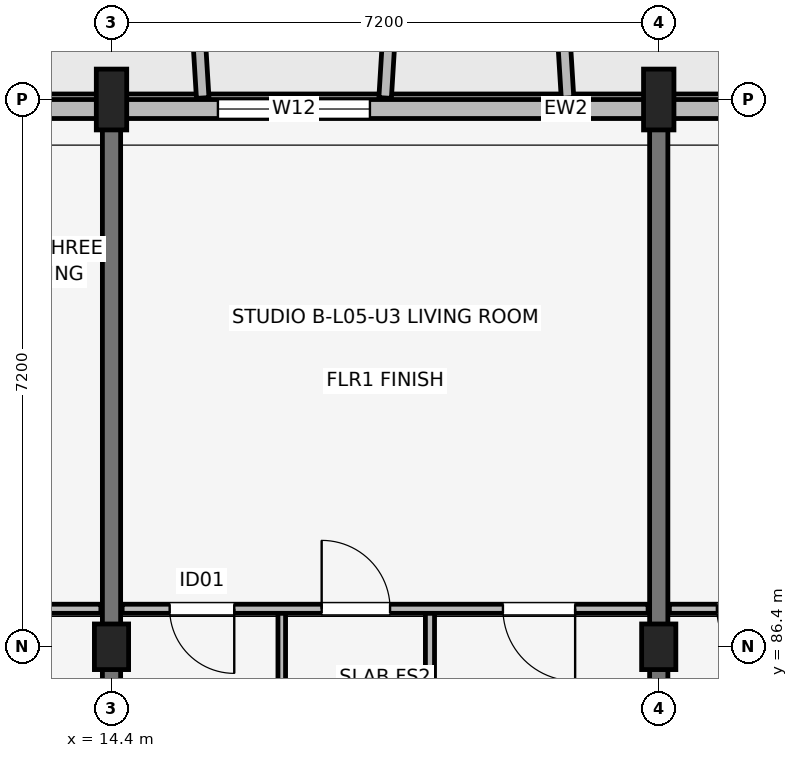
"""IFC4 building model, lengths in metres.
Left out: names, types, materials, properties, quantities, classifications, styles, units other than length and angle.
Written with IfcOpenShell. Run it as: python <this file> out.ifc"""

import sys

from ifc_helpers import new_model, si_unit, direction, frame, frame_2d, origin, origin_2d, place, context, subcontext, project, spatial, rectangle, extrude, element, fill, save


model = new_model("IFC4")
c1 = context("Model", 3, precision=1e-05, world=origin(), true_north=direction((0.0, 1.0)))
c2 = subcontext(c1, "Body", "Model", "MODEL_VIEW")
j1 = project(units=[si_unit("LENGTHUNIT", "METRE"), si_unit("PLANEANGLEUNIT", "RADIAN")], contexts=[c1])
p1 = place(None, origin())
s1 = spatial("IfcSite", under=j1, at=p1, CompositionType="ELEMENT")
p2 = place(p1, origin())
s2 = spatial("IfcBuilding", under=s1, at=p2, CompositionType="ELEMENT")
p3 = place(p2, frame((0.0, 0.0, 18.15)))
s3 = spatial("IfcBuildingStorey", under=s2, at=p3, CompositionType="ELEMENT", Elevation=18.15)
p4 = place(p3, frame((14.4, 86.4, 0.0), z_axis=(0.0, 0.0, 1.0), x_axis=(1.0, 0.0, 0.0)))
e1 = element("IfcColumn", 1, at=p4, inside=s3, PredefinedType="COLUMN", context=c2, shape_type="SweptSolid", body=[
    extrude(rectangle(XDim=0.45, YDim=0.6, at=origin_2d()), origin(), (0.0, 0.0, 1.0), 3.15),
])
p5 = place(p3, frame((14.4, 93.6, 0.0), z_axis=(0.0, 0.0, 1.0), x_axis=(1.0, 0.0, 0.0)))
e2 = element("IfcColumn", 2, at=p5, inside=s3, PredefinedType="COLUMN", context=c2, shape_type="SweptSolid", body=[
    extrude(rectangle(XDim=0.4, YDim=0.8, at=origin_2d()), origin(), (0.0, 0.0, 1.0), 3.15),
])
p6 = place(p3, frame((21.6, 86.4, 0.0), z_axis=(0.0, 0.0, 1.0), x_axis=(1.0, 0.0, 0.0)))
e3 = element("IfcColumn", 3, at=p6, inside=s3, PredefinedType="COLUMN", context=c2, shape_type="SweptSolid", body=[
    extrude(rectangle(XDim=0.45, YDim=0.6, at=origin_2d()), origin(), (0.0, 0.0, 1.0), 3.15),
])
p7 = place(p3, frame((21.6, 93.6, 0.0), z_axis=(0.0, 0.0, 1.0), x_axis=(1.0, 0.0, 0.0)))
e4 = element("IfcColumn", 4, at=p7, inside=s3, PredefinedType="COLUMN", context=c2, shape_type="SweptSolid", body=[
    extrude(rectangle(XDim=0.4, YDim=0.8, at=origin_2d()), origin(), (0.0, 0.0, 1.0), 3.15),
])
for number, where, z_axis, x_axis in (
    (5, (14.4, 83.85, 0.0), (0.0, 0.0, 1.0), (0.0, 1.0, 0.0)),
    (6, (21.6, 83.85, 0.0), (0.0, 0.0, 1.0), (0.0, 1.0, 0.0)),
):
    element("IfcWall", number, at=place(p3, frame(where, z_axis=z_axis, x_axis=x_axis)), inside=s3, PredefinedType="SHEAR", context=c2, shape_type="SweptSolid", body=[
        extrude(rectangle(XDim=9.4, YDim=0.24, at=frame_2d((4.7, 0.0))), origin(), (0.0, 0.0, 1.0), 3.15),
    ])
p8 = place(p3, frame((32.8, 93.475, 0.0), z_axis=(0.0, 0.0, 1.0), x_axis=(-1.0, 0.0, 0.0)))
e7 = element("IfcWall", 7, at=p8, inside=s3, PredefinedType="SOLIDWALL", context=c2, shape_type="SweptSolid", body=[
    extrude(rectangle(XDim=29.6, YDim=0.25, at=frame_2d((14.8, 0.0))), origin(), (0.0, 0.0, 1.0), 2.43),
])
p9 = place(p8, frame((21.625, 0.0, 0.0), z_axis=(0.0, 0.0, 1.0), x_axis=(-1.0, 0.0, 0.0)))
e8 = element("IfcOpeningElement", 8, at=p9, cuts=e7, PredefinedType="OPENING", context=c2, shape_type="SweptSolid", body=[
    extrude(rectangle(XDim=1.65, YDim=2.15, at=frame_2d((0.825, 1.075))), frame((0.0, 0.135, 0.0), z_axis=(0.0, -1.0, 0.0), x_axis=(1.0, 0.0, 0.0)), (0.0, 0.0, 1.0), 0.27),
])
p10 = place(p8, frame((7.15, 0.0, 0.0), z_axis=(0.0, 0.0, 1.0), x_axis=(-1.0, 0.0, 0.0)))
e9 = element("IfcOpeningElement", 9, at=p10, cuts=e7, PredefinedType="OPENING", context=c2, shape_type="SweptSolid", body=[
    extrude(rectangle(XDim=1.5, YDim=2.15, at=frame_2d((0.75, 1.075))), frame((0.0, 0.135, 0.0), z_axis=(0.0, -1.0, 0.0), x_axis=(1.0, 0.0, 0.0)), (0.0, 0.0, 1.0), 0.27),
])
p11 = place(p8, frame((27.615, 0.0, 0.75)))
e10 = element("IfcOpeningElement", 10, at=p11, cuts=e7, PredefinedType="OPENING", context=c2, shape_type="SweptSolid", body=[
    extrude(rectangle(XDim=0.6, YDim=1.25, at=frame_2d((0.3, 0.625))), frame((0.0, 0.135, 0.0), z_axis=(0.0, -1.0, 0.0), x_axis=(1.0, 0.0, 0.0)), (0.0, 0.0, 1.0), 0.27),
])
p12 = place(p8, frame((23.525, 0.0, 0.75)))
e11 = element("IfcOpeningElement", 11, at=p12, cuts=e7, PredefinedType="OPENING", context=c2, shape_type="SweptSolid", body=[
    extrude(rectangle(XDim=0.72, YDim=1.35, at=frame_2d((0.36, 0.675))), frame((0.0, 0.135, 0.0), z_axis=(0.0, -1.0, 0.0), x_axis=(1.0, 0.0, 0.0)), (0.0, 0.0, 1.0), 0.27),
])
p13 = place(p8, frame((15.0, 0.0, 0.67)))
e12 = element("IfcOpeningElement", 12, at=p13, cuts=e7, PredefinedType="OPENING", context=c2, shape_type="SweptSolid", body=[
    extrude(rectangle(XDim=2.0, YDim=1.65, at=frame_2d((1.0, 0.825))), frame((0.0, 0.135, 0.0), z_axis=(0.0, -1.0, 0.0), x_axis=(1.0, 0.0, 0.0)), (0.0, 0.0, 1.0), 0.27),
])
p14 = place(p8, frame((9.125, 0.0, 0.75)))
e13 = element("IfcOpeningElement", 13, at=p14, cuts=e7, PredefinedType="OPENING", context=c2, shape_type="SweptSolid", body=[
    extrude(rectangle(XDim=0.72, YDim=1.35, at=frame_2d((0.36, 0.675))), frame((0.0, 0.135, 0.0), z_axis=(0.0, -1.0, 0.0), x_axis=(1.0, 0.0, 0.0)), (0.0, 0.0, 1.0), 0.27),
])
p15 = place(p8, frame((0.525, 0.0, 0.67)))
e14 = element("IfcOpeningElement", 14, at=p15, cuts=e7, PredefinedType="OPENING", context=c2, shape_type="SweptSolid", body=[
    extrude(rectangle(XDim=2.15, YDim=1.65, at=frame_2d((1.075, 0.825))), frame((0.0, 0.135, 0.0), z_axis=(0.0, -1.0, 0.0), x_axis=(1.0, 0.0, 0.0)), (0.0, 0.0, 1.0), 0.27),
])
for number, where, z_axis, x_axis in (
    (15, (15.6, 93.62, 0.0), (0.0, 0.0, 1.0), (-0.061, 0.998, 0.0)),
    (16, (18.0, 93.62, 0.0), (0.0, 0.0, 1.0), (0.061, 0.998, 0.0)),
    (17, (20.4, 93.62, 0.0), (0.0, 0.0, 1.0), (-0.061, 0.998, 0.0)),
):
    element("IfcWall", number, at=place(p3, frame(where, z_axis=z_axis, x_axis=x_axis)), inside=s3, PredefinedType="ELEMENTEDWALL", context=c2, shape_type="SweptSolid", body=[
        extrude(rectangle(XDim=1.964, YDim=0.165, at=frame_2d((0.982, 0.0))), origin(), (0.0, 0.0, 1.0), 2.48),
    ])
p16 = place(p3, frame((7.34, 86.9, 0.0), z_axis=(0.0, 0.0, 1.0), x_axis=(1.0, 0.0, 0.0)))
e18 = element("IfcWall", 18, at=p16, inside=s3, PredefinedType="PARTITIONING", context=c2, shape_type="SweptSolid", body=[
    extrude(rectangle(XDim=6.92, YDim=0.12, at=frame_2d((3.46, 0.0))), origin(), (0.0, 0.0, 1.0), 2.38),
])
p17 = place(p16, frame((0.625, 0.0, 0.0)))
e19 = element("IfcOpeningElement", 19, at=p17, cuts=e18, PredefinedType="OPENING", context=c2, shape_type="SweptSolid", body=[
    extrude(rectangle(XDim=0.85, YDim=2.08, at=frame_2d((0.425, 1.04))), frame((0.0, 0.07, 0.0), z_axis=(0.0, -1.0, 0.0), x_axis=(1.0, 0.0, 0.0)), (0.0, 0.0, 1.0), 0.14),
])
p18 = place(p16, frame((3.675, 0.0, 0.0), z_axis=(0.0, 0.0, 1.0), x_axis=(-1.0, 0.0, 0.0)))
e20 = element("IfcOpeningElement", 20, at=p18, cuts=e18, PredefinedType="OPENING", context=c2, shape_type="SweptSolid", body=[
    extrude(rectangle(XDim=0.9, YDim=2.08, at=frame_2d((0.45, 1.04))), frame((0.0, 0.07, 0.0), z_axis=(0.0, -1.0, 0.0), x_axis=(1.0, 0.0, 0.0)), (0.0, 0.0, 1.0), 0.14),
])
p19 = place(p16, frame((5.16, 0.0, 0.0)))
e21 = element("IfcOpeningElement", 21, at=p19, cuts=e18, PredefinedType="OPENING", context=c2, shape_type="SweptSolid", body=[
    extrude(rectangle(XDim=0.95, YDim=2.08, at=frame_2d((0.475, 1.04))), frame((0.0, 0.07, 0.0), z_axis=(0.0, -1.0, 0.0), x_axis=(1.0, 0.0, 0.0)), (0.0, 0.0, 1.0), 0.14),
])
p20 = place(p3, frame((16.64, 83.7, 0.0), z_axis=(0.0, 0.0, 1.0), x_axis=(0.0, 1.0, 0.0)))
e22 = element("IfcWall", 22, at=p20, inside=s3, PredefinedType="PARTITIONING", context=c2, shape_type="SweptSolid", body=[
    extrude(rectangle(XDim=3.2, YDim=0.1, at=frame_2d((1.6, 0.0))), origin(), (0.0, 0.0, 1.0), 2.375),
])
p21 = place(p3, frame((18.59, 83.7, 0.0), z_axis=(0.0, 0.0, 1.0), x_axis=(0.0, 1.0, 0.0)))
e23 = element("IfcWall", 23, at=p21, inside=s3, PredefinedType="PARTITIONING", context=c2, shape_type="SweptSolid", body=[
    extrude(rectangle(XDim=3.2, YDim=0.12, at=frame_2d((1.6, 0.0))), origin(), (0.0, 0.0, 1.0), 2.375),
])
p22 = place(p3, frame((14.54, 86.9, 0.0), z_axis=(0.0, 0.0, 1.0), x_axis=(1.0, 0.0, 0.0)))
e24 = element("IfcWall", 24, at=p22, inside=s3, PredefinedType="PARTITIONING", context=c2, shape_type="SweptSolid", body=[
    extrude(rectangle(XDim=6.92, YDim=0.12, at=frame_2d((3.46, 0.0))), origin(), (0.0, 0.0, 1.0), 2.38),
])
p23 = place(p22, frame((1.475, 0.0, 0.0), z_axis=(0.0, 0.0, 1.0), x_axis=(-1.0, 0.0, 0.0)))
e25 = element("IfcOpeningElement", 25, at=p23, cuts=e24, PredefinedType="OPENING", context=c2, shape_type="SweptSolid", body=[
    extrude(rectangle(XDim=0.85, YDim=2.08, at=frame_2d((0.425, 1.04))), frame((0.0, 0.07, 0.0), z_axis=(0.0, -1.0, 0.0), x_axis=(1.0, 0.0, 0.0)), (0.0, 0.0, 1.0), 0.14),
])
p24 = place(p22, frame((2.625, 0.0, 0.0)))
e26 = element("IfcOpeningElement", 26, at=p24, cuts=e24, PredefinedType="OPENING", context=c2, shape_type="SweptSolid", body=[
    extrude(rectangle(XDim=0.9, YDim=2.08, at=frame_2d((0.45, 1.04))), frame((0.0, 0.07, 0.0), z_axis=(0.0, -1.0, 0.0), x_axis=(1.0, 0.0, 0.0)), (0.0, 0.0, 1.0), 0.14),
])
p25 = place(p22, frame((5.96, 0.0, 0.0), z_axis=(0.0, 0.0, 1.0), x_axis=(-1.0, 0.0, 0.0)))
e27 = element("IfcOpeningElement", 27, at=p25, cuts=e24, PredefinedType="OPENING", context=c2, shape_type="SweptSolid", body=[
    extrude(rectangle(XDim=0.95, YDim=2.08, at=frame_2d((0.475, 1.04))), frame((0.0, 0.07, 0.0), z_axis=(0.0, -1.0, 0.0), x_axis=(1.0, 0.0, 0.0)), (0.0, 0.0, 1.0), 0.14),
])
p26 = place(p3, frame((21.74, 86.9, 0.0), z_axis=(0.0, 0.0, 1.0), x_axis=(1.0, 0.0, 0.0)))
e28 = element("IfcWall", 28, at=p26, inside=s3, PredefinedType="PARTITIONING", context=c2, shape_type="SweptSolid", body=[
    extrude(rectangle(XDim=6.92, YDim=0.12, at=frame_2d((3.46, 0.0))), origin(), (0.0, 0.0, 1.0), 2.38),
])
p27 = place(p26, frame((1.475, 0.0, 0.0), z_axis=(0.0, 0.0, 1.0), x_axis=(-1.0, 0.0, 0.0)))
e29 = element("IfcOpeningElement", 29, at=p27, cuts=e28, PredefinedType="OPENING", context=c2, shape_type="SweptSolid", body=[
    extrude(rectangle(XDim=0.85, YDim=2.08, at=frame_2d((0.425, 1.04))), frame((0.0, 0.07, 0.0), z_axis=(0.0, -1.0, 0.0), x_axis=(1.0, 0.0, 0.0)), (0.0, 0.0, 1.0), 0.14),
])
p28 = place(p26, frame((2.775, 0.0, 0.0)))
e30 = element("IfcOpeningElement", 30, at=p28, cuts=e28, PredefinedType="OPENING", context=c2, shape_type="SweptSolid", body=[
    extrude(rectangle(XDim=0.9, YDim=2.08, at=frame_2d((0.45, 1.04))), frame((0.0, 0.07, 0.0), z_axis=(0.0, -1.0, 0.0), x_axis=(1.0, 0.0, 0.0)), (0.0, 0.0, 1.0), 0.14),
])
p29 = place(p26, frame((6.11, 0.0, 0.0), z_axis=(0.0, 0.0, 1.0), x_axis=(-1.0, 0.0, 0.0)))
e31 = element("IfcOpeningElement", 31, at=p29, cuts=e28, PredefinedType="OPENING", context=c2, shape_type="SweptSolid", body=[
    extrude(rectangle(XDim=0.95, YDim=2.08, at=frame_2d((0.475, 1.04))), frame((0.0, 0.07, 0.0), z_axis=(0.0, -1.0, 0.0), x_axis=(1.0, 0.0, 0.0)), (0.0, 0.0, 1.0), 0.14),
])
p30 = place(p13, origin())
e32 = element("IfcWindow", 32, at=p30, inside=s3, PartitioningType="SINGLE_PANEL", PredefinedType="WINDOW", context=c2, shape_type="SweptSolid", body=[
    extrude(rectangle(XDim=2.0, YDim=1.65, at=frame_2d((1.0, 0.825))), frame((0.0, 0.03, 0.0), z_axis=(0.0, -1.0, 0.0), x_axis=(1.0, 0.0, 0.0)), (0.0, 0.0, 1.0), 0.06),
])
fill(e12, e32)
p31 = place(p23, origin())
e33 = element("IfcDoor", 33, at=p31, inside=s3, OperationType="SINGLE_SWING_RIGHT", PredefinedType="DOOR", context=c2, shape_type="SweptSolid", body=[
    extrude(rectangle(XDim=0.85, YDim=2.08, at=frame_2d((0.425, 1.04))), frame((0.0, 0.025, 0.0), z_axis=(0.0, -1.0, 0.0), x_axis=(1.0, 0.0, 0.0)), (0.0, 0.0, 1.0), 0.05),
])
fill(e25, e33)
p32 = place(p24, origin())
e34 = element("IfcDoor", 34, at=p32, inside=s3, OperationType="SINGLE_SWING_LEFT", PredefinedType="DOOR", context=c2, shape_type="SweptSolid", body=[
    extrude(rectangle(XDim=0.9, YDim=2.08, at=frame_2d((0.45, 1.04))), frame((0.0, 0.025, 0.0), z_axis=(0.0, -1.0, 0.0), x_axis=(1.0, 0.0, 0.0)), (0.0, 0.0, 1.0), 0.05),
])
fill(e26, e34)
p33 = place(p25, origin())
e35 = element("IfcDoor", 35, at=p33, inside=s3, OperationType="SINGLE_SWING_RIGHT", PredefinedType="DOOR", context=c2, shape_type="SweptSolid", body=[
    extrude(rectangle(XDim=0.95, YDim=2.08, at=frame_2d((0.475, 1.04))), frame((0.0, 0.025, 0.0), z_axis=(0.0, -1.0, 0.0), x_axis=(1.0, 0.0, 0.0)), (0.0, 0.0, 1.0), 0.05),
])
fill(e27, e35)
p34 = place(p27, origin())
e36 = element("IfcDoor", 36, at=p34, inside=s3, OperationType="SINGLE_SWING_RIGHT", PredefinedType="DOOR", context=c2, shape_type="SweptSolid", body=[
    extrude(rectangle(XDim=0.85, YDim=2.08, at=frame_2d((0.425, 1.04))), frame((0.0, 0.025, 0.0), z_axis=(0.0, -1.0, 0.0), x_axis=(1.0, 0.0, 0.0)), (0.0, 0.0, 1.0), 0.05),
])
fill(e29, e36)
save(model, sys.argv[1])
